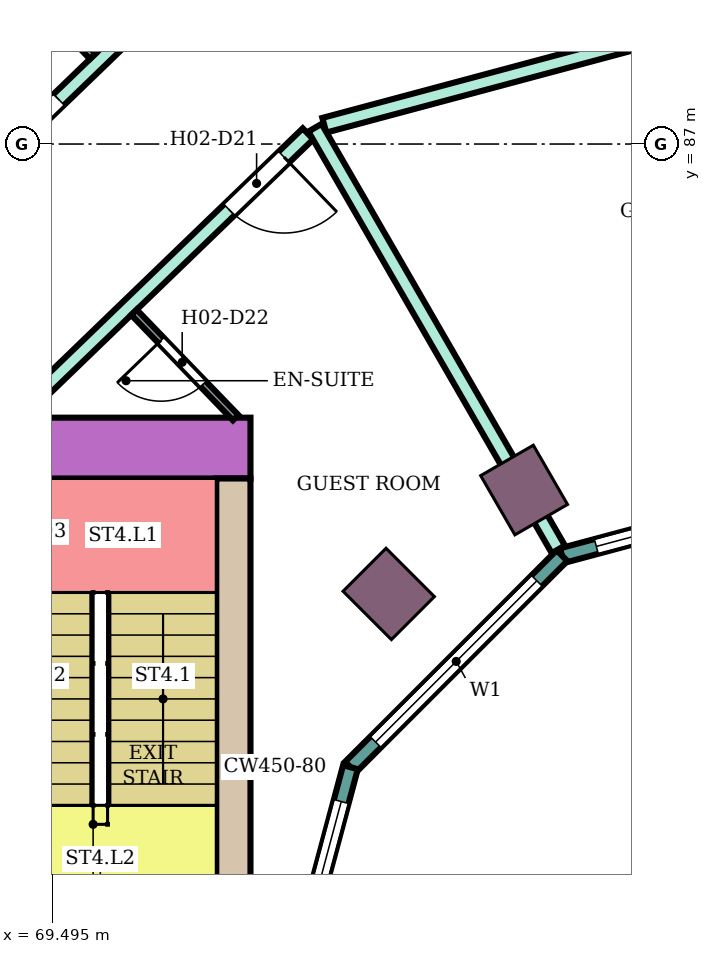
"""IFC4 building model, lengths in metres.
Left out: names, types, materials, properties, quantities, classifications, styles, units other than length and angle.
Written with IfcOpenShell. Run it as: python <this file> out.ifc"""

import sys

from ifc_helpers import new_model, si_unit, direction, frame, frame_2d, origin, origin_2d, place, context, subcontext, project, spatial, rectangle, extrude, element, fill, save


model = new_model("IFC4")
c1 = context("Model", 3, precision=1e-05, world=origin(), true_north=direction((0.0, 1.0)))
c2 = subcontext(c1, "Body", "Model", "MODEL_VIEW")
j1 = project(units=[si_unit("LENGTHUNIT", "METRE"), si_unit("PLANEANGLEUNIT", "RADIAN")], contexts=[c1])
p1 = place(None, origin())
s1 = spatial("IfcSite", under=j1, at=p1, CompositionType="ELEMENT")
p2 = place(p1, origin())
s2 = spatial("IfcBuilding", under=s1, at=p2, CompositionType="ELEMENT")
p3 = place(p2, frame((0.0, 0.0, 44.0)))
s3 = spatial("IfcBuildingStorey", under=s2, at=p3, CompositionType="ELEMENT", Elevation=44.0)
for number, where, z_axis, x_axis in (
    (1, (75.7, 82.448, 0.0), (0.0, 0.0, 1.0), (-0.5, 0.866, 0.0)),
    (2, (73.919, 81.081, 0.0), (0.0, 0.0, 1.0), (-0.707, 0.707, 0.0)),
):
    element("IfcColumn", number, at=place(p3, frame(where, z_axis=z_axis, x_axis=x_axis)), inside=s3, PredefinedType="COLUMN", context=c2, shape_type="SweptSolid", body=[
        extrude(rectangle(XDim=0.9, YDim=0.8, at=origin_2d()), origin(), (0.0, 0.0, 1.0), 3.8),
    ])
p4 = place(p3, frame((72.1, 83.0, 0.0), z_axis=(0.0, 0.0, 1.0), x_axis=(-1.0, 0.0, 0.0)))
e3 = element("IfcWall", 3, at=p4, inside=s3, PredefinedType="SHEAR", context=c2, shape_type="SweptSolid", body=[
    extrude(rectangle(XDim=14.7, YDim=0.8, at=frame_2d((7.35, 0.0))), origin(), (0.0, 0.0, 1.0), 3.48),
])
p5 = place(p4, frame((4.2, 0.0, 0.0)))
e4 = element("IfcOpeningElement", 4, at=p5, cuts=e3, PredefinedType="OPENING", context=c2, shape_type="SweptSolid", body=[
    extrude(rectangle(XDim=2.4, YDim=2.4, at=frame_2d((1.2, 1.2))), frame((0.0, 0.41, 0.0), z_axis=(0.0, -1.0, 0.0), x_axis=(1.0, 0.0, 0.0)), (0.0, 0.0, 1.0), 0.82),
])
p6 = place(p3, frame((71.875, 82.6, 0.0), z_axis=(0.0, 0.0, 1.0), x_axis=(0.0, -1.0, 0.0)))
e5 = element("IfcWall", 5, at=p6, inside=s3, PredefinedType="SHEAR", context=c2, shape_type="SweptSolid", body=[
    extrude(rectangle(XDim=7.6, YDim=0.45, at=frame_2d((3.8, 0.0))), origin(), (0.0, 0.0, 1.0), 3.48),
])
p7 = place(p3, frame((80.0, 82.604, 0.0), z_axis=(0.0, 0.0, 1.0), x_axis=(-0.965933654434, -0.258789828301, 0.0)))
e6 = element("IfcWall", 6, at=p7, inside=s3, PredefinedType="NOTDEFINED", context=c2, shape_type="SweptSolid", body=[
    extrude(rectangle(XDim=3.936, YDim=0.2, at=frame_2d((1.968, 0.0))), origin(), (0.0, 0.0, 1.0), 3.8),
])
p8 = place(p7, frame((0.468, 0.0, 0.9)))
e7 = element("IfcOpeningElement", 7, at=p8, cuts=e6, PredefinedType="OPENING", context=c2, shape_type="SweptSolid", body=[
    extrude(rectangle(XDim=3.0, YDim=2.3, at=frame_2d((1.5, 1.15))), frame((0.0, 0.11, 0.0), z_axis=(0.0, -1.0, 0.0), x_axis=(1.0, 0.0, 0.0)), (0.0, 0.0, 1.0), 0.22),
])
p9 = place(p3, frame((76.198, 81.585, 0.0), z_axis=(0.0, 0.0, 1.0), x_axis=(-0.707106781187, -0.707106781187, 0.0)))
e8 = element("IfcWall", 8, at=p9, inside=s3, PredefinedType="NOTDEFINED", context=c2, shape_type="SweptSolid", body=[
    extrude(rectangle(XDim=3.936, YDim=0.2, at=frame_2d((1.968, 0.0))), origin(), (0.0, 0.0, 1.0), 3.8),
])
p10 = place(p9, frame((0.468, 0.0, 0.9)))
e9 = element("IfcOpeningElement", 9, at=p10, cuts=e8, PredefinedType="OPENING", context=c2, shape_type="SweptSolid", body=[
    extrude(rectangle(XDim=3.0, YDim=2.3, at=frame_2d((1.5, 1.15))), frame((0.0, 0.11, 0.0), z_axis=(0.0, -1.0, 0.0), x_axis=(1.0, 0.0, 0.0)), (0.0, 0.0, 1.0), 0.22),
])
p11 = place(p3, frame((73.415, 78.802, 0.0), z_axis=(0.0, 0.0, 1.0), x_axis=(-0.258789828301, -0.965933654434, 0.0)))
e10 = element("IfcWall", 10, at=p11, inside=s3, PredefinedType="NOTDEFINED", context=c2, shape_type="SweptSolid", body=[
    extrude(rectangle(XDim=3.936, YDim=0.2, at=frame_2d((1.968, 0.0))), origin(), (0.0, 0.0, 1.0), 3.8),
])
p12 = place(p11, frame((0.468, 0.0, 0.9)))
e11 = element("IfcOpeningElement", 11, at=p12, cuts=e10, PredefinedType="OPENING", context=c2, shape_type="SweptSolid", body=[
    extrude(rectangle(XDim=3.0, YDim=2.3, at=frame_2d((1.5, 1.15))), frame((0.0, 0.11, 0.0), z_axis=(0.0, -1.0, 0.0), x_axis=(1.0, 0.0, 0.0)), (0.0, 0.0, 1.0), 0.22),
])
p13 = place(p3, frame((66.796, 84.9, 0.0), z_axis=(0.0, 0.0, 1.0), x_axis=(0.719690131178, 0.694295409092, 0.0)))
e12 = element("IfcWall", 12, at=p13, inside=s3, PredefinedType="PARTITIONING", context=c2, shape_type="SweptSolid", body=[
    extrude(rectangle(XDim=6.585, YDim=0.2, at=frame_2d((3.293, 0.0))), origin(), (0.0, 0.0, 1.0), 3.35),
])
p14 = place(p13, frame((2.867, 0.0, 0.0)))
e13 = element("IfcOpeningElement", 13, at=p14, cuts=e12, PredefinedType="OPENING", context=c2, shape_type="SweptSolid", body=[
    extrude(rectangle(XDim=1.0, YDim=2.1, at=frame_2d((0.5, 1.05))), frame((0.0, 0.11, 0.0), z_axis=(0.0, -1.0, 0.0), x_axis=(1.0, 0.0, 0.0)), (0.0, 0.0, 1.0), 0.22),
])
p15 = place(p3, frame((68.987, 83.4, 0.0), z_axis=(0.0, 0.0, 1.0), x_axis=(0.719591503389, 0.694397629784, 0.0)))
e14 = element("IfcWall", 14, at=p15, inside=s3, PredefinedType="PARTITIONING", context=c2, shape_type="SweptSolid", body=[
    extrude(rectangle(XDim=5.378, YDim=0.2, at=frame_2d((2.689, 0.0))), origin(), (0.0, 0.0, 1.0), 3.35),
])
p16 = place(p15, frame((3.938, 0.0, 0.0)))
e15 = element("IfcOpeningElement", 15, at=p16, cuts=e14, PredefinedType="OPENING", context=c2, shape_type="SweptSolid", body=[
    extrude(rectangle(XDim=1.0, YDim=2.1, at=frame_2d((0.5, 1.05))), frame((0.0, 0.11, 0.0), z_axis=(0.0, -1.0, 0.0), x_axis=(1.0, 0.0, 0.0)), (0.0, 0.0, 1.0), 0.22),
])
p17 = place(p3, frame((73.071, 87.247, 0.0), z_axis=(0.0, 0.0, 1.0), x_axis=(0.965920206274, 0.258840018373, 0.0)))
e16 = element("IfcWall", 16, at=p17, inside=s3, PredefinedType="PARTITIONING", context=c2, shape_type="SweptSolid", body=[
    extrude(rectangle(XDim=7.123, YDim=0.2, at=frame_2d((3.562, 0.0))), origin(), (0.0, 0.0, 1.0), 3.35),
])
p18 = place(p3, frame((72.949, 87.215, 0.0), z_axis=(0.0, 0.0, 1.0), x_axis=(0.499890755261, -0.866088467077, 0.0)))
e17 = element("IfcWall", 17, at=p18, inside=s3, PredefinedType="PARTITIONING", context=c2, shape_type="SweptSolid", body=[
    extrude(rectangle(XDim=6.404, YDim=0.2, at=frame_2d((3.202, 0.0))), origin(), (0.0, 0.0, 1.0), 3.35),
])
p19 = place(p3, frame((68.185, 90.06, 0.0), z_axis=(0.0, 0.0, 1.0), x_axis=(0.69446127412, -0.719530081892, 0.0)))
e18 = element("IfcWall", 18, at=p19, inside=s3, PredefinedType="PARTITIONING", context=c2, shape_type="SweptSolid", body=[
    extrude(rectangle(XDim=2.649, YDim=0.1, at=frame_2d((1.324, 0.0))), origin(), (0.0, 0.0, 1.0), 3.35),
])
p20 = place(p19, frame((0.95, 0.0, 0.0)))
e19 = element("IfcOpeningElement", 19, at=p20, cuts=e18, PredefinedType="OPENING", context=c2, shape_type="SweptSolid", body=[
    extrude(rectangle(XDim=0.8, YDim=2.1, at=frame_2d((0.4, 1.05))), frame((0.0, 0.06, 0.0), z_axis=(0.0, -1.0, 0.0), x_axis=(1.0, 0.0, 0.0)), (0.0, 0.0, 1.0), 0.12),
])
p21 = place(p3, frame((70.567, 84.786, 0.0), z_axis=(0.0, 0.0, 1.0), x_axis=(0.694447472534, -0.719543402368, 0.0)))
e20 = element("IfcWall", 20, at=p21, inside=s3, PredefinedType="PARTITIONING", context=c2, shape_type="SweptSolid", body=[
    extrude(rectangle(XDim=1.926, YDim=0.1, at=frame_2d((0.963, 0.0))), origin(), (0.0, 0.0, 1.0), 3.35),
])
p22 = place(p21, frame((0.513, 0.0, 0.0)))
e21 = element("IfcOpeningElement", 21, at=p22, cuts=e20, PredefinedType="OPENING", context=c2, shape_type="SweptSolid", body=[
    extrude(rectangle(XDim=0.8, YDim=2.1, at=frame_2d((0.4, 1.05))), frame((0.0, 0.06, 0.0), z_axis=(0.0, -1.0, 0.0), x_axis=(1.0, 0.0, 0.0)), (0.0, 0.0, 1.0), 0.12),
])
p23 = place(p8, origin())
e22 = element("IfcWindow", 22, at=p23, inside=s3, PartitioningType="SINGLE_PANEL", PredefinedType="WINDOW", context=c2, shape_type="SweptSolid", body=[
    extrude(rectangle(XDim=3.0, YDim=2.3, at=frame_2d((1.5, 1.15))), frame((0.0, 0.03, 0.0), z_axis=(0.0, -1.0, 0.0), x_axis=(1.0, 0.0, 0.0)), (0.0, 0.0, 1.0), 0.06),
])
fill(e7, e22)
p24 = place(p10, origin())
e23 = element("IfcWindow", 23, at=p24, inside=s3, PartitioningType="SINGLE_PANEL", PredefinedType="WINDOW", context=c2, shape_type="SweptSolid", body=[
    extrude(rectangle(XDim=3.0, YDim=2.3, at=frame_2d((1.5, 1.15))), frame((0.0, 0.03, 0.0), z_axis=(0.0, -1.0, 0.0), x_axis=(1.0, 0.0, 0.0)), (0.0, 0.0, 1.0), 0.06),
])
fill(e9, e23)
p25 = place(p12, origin())
e24 = element("IfcWindow", 24, at=p25, inside=s3, PartitioningType="SINGLE_PANEL", PredefinedType="WINDOW", context=c2, shape_type="SweptSolid", body=[
    extrude(rectangle(XDim=3.0, YDim=2.3, at=frame_2d((1.5, 1.15))), frame((0.0, 0.03, 0.0), z_axis=(0.0, -1.0, 0.0), x_axis=(1.0, 0.0, 0.0)), (0.0, 0.0, 1.0), 0.06),
])
fill(e11, e24)
p26 = place(p14, origin())
e25 = element("IfcDoor", 25, at=p26, inside=s3, OperationType="SINGLE_SWING_LEFT", PredefinedType="DOOR", context=c2, shape_type="SweptSolid", body=[
    extrude(rectangle(XDim=1.0, YDim=2.1, at=frame_2d((0.5, 1.05))), frame((0.0, 0.025, 0.0), z_axis=(0.0, -1.0, 0.0), x_axis=(1.0, 0.0, 0.0)), (0.0, 0.0, 1.0), 0.05),
])
fill(e13, e25)
p27 = place(p16, frame((1.0, 0.0, 0.0), z_axis=(0.0, 0.0, 1.0), x_axis=(-1.0, 0.0, 0.0)))
e26 = element("IfcDoor", 26, at=p27, inside=s3, OperationType="SINGLE_SWING_LEFT", PredefinedType="DOOR", context=c2, shape_type="SweptSolid", body=[
    extrude(rectangle(XDim=1.0, YDim=2.1, at=frame_2d((0.5, 1.05))), frame((0.0, 0.025, 0.0), z_axis=(0.0, -1.0, 0.0), x_axis=(1.0, 0.0, 0.0)), (0.0, 0.0, 1.0), 0.05),
])
fill(e15, e26)
p28 = place(p22, frame((0.8, 0.0, 0.0), z_axis=(0.0, 0.0, 1.0), x_axis=(-1.0, 0.0, 0.0)))
e27 = element("IfcDoor", 27, at=p28, inside=s3, OperationType="SINGLE_SWING_RIGHT", PredefinedType="DOOR", context=c2, shape_type="SweptSolid", body=[
    extrude(rectangle(XDim=0.8, YDim=2.1, at=frame_2d((0.4, 1.05))), frame((0.0, 0.025, 0.0), z_axis=(0.0, -1.0, 0.0), x_axis=(1.0, 0.0, 0.0)), (0.0, 0.0, 1.0), 0.05),
])
fill(e21, e27)
save(model, sys.argv[1])
